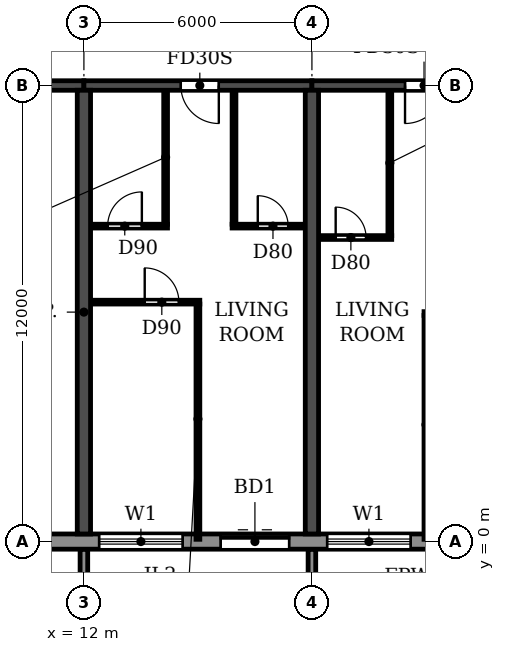
"""IFC4 building model, lengths in metres.
Left out: names, types, materials, properties, quantities, classifications, styles, units other than length and angle.
Written with IfcOpenShell. Run it as: python <this file> out.ifc"""

import sys

from ifc_helpers import new_model, si_unit, direction, frame, frame_2d, origin, place, context, subcontext, project, spatial, polyline, rectangle, outline, extrude, source, transform, mapped, element, fill, save


model = new_model("IFC4")
c1 = context("Model", 3, precision=1e-05, world=origin(), true_north=direction((0.0, 1.0)))
c2 = subcontext(c1, "Body", "Model", "MODEL_VIEW")
j1 = project(units=[si_unit("LENGTHUNIT", "METRE"), si_unit("PLANEANGLEUNIT", "RADIAN")], contexts=[c1])
p1 = place(None, origin())
s1 = spatial("IfcSite", under=j1, at=p1, CompositionType="ELEMENT")
p2 = place(p1, origin())
s2 = spatial("IfcBuilding", under=s1, at=p2, CompositionType="ELEMENT")
p3 = place(p2, frame((0.0, 0.0, 102.6)))
s3 = spatial("IfcBuildingStorey", under=s2, at=p3, CompositionType="ELEMENT", Elevation=102.6)
for number, where, z_axis, x_axis in (
    (1, (12.0, 0.2, 0.0), (0.0, 0.0, 1.0), (0.0, 1.0, 0.0)),
    (2, (18.0, 0.2, 0.0), (0.0, 0.0, 1.0), (0.0, 1.0, 0.0)),
):
    element("IfcWall", number, at=place(p3, frame(where, z_axis=z_axis, x_axis=x_axis)), inside=s3, PredefinedType="SHEAR", context=c2, shape_type="SweptSolid", body=[
        extrude(rectangle(XDim=11.675, YDim=0.35, at=frame_2d((5.837, 0.0))), origin(), (0.0, 0.0, 1.0), 3.0),
    ])
p4 = place(p3, frame((6.2, 12.0, 0.0), z_axis=(0.0, 0.0, 1.0), x_axis=(1.0, 0.0, 0.0)))
e3 = element("IfcWall", 3, at=p4, inside=s3, PredefinedType="SHEAR", context=c2, shape_type="SweptSolid", body=[
    extrude(rectangle(XDim=5.8, YDim=0.25, at=frame_2d((2.9, 0.0))), origin(), (0.0, 0.0, 1.0), 2.4),
])
p5 = place(p4, frame((2.3, 0.0, 0.0)))
e4 = element("IfcOpeningElement", 4, at=p5, cuts=e3, PredefinedType="OPENING", context=c2, shape_type="SweptSolid", body=[
    extrude(rectangle(XDim=1.0, YDim=2.1, at=frame_2d((0.5, 1.05))), frame((0.0, 0.135, 0.0), z_axis=(0.0, -1.0, 0.0), x_axis=(1.0, 0.0, 0.0)), (0.0, 0.0, 1.0), 0.27),
])
p6 = place(p3, frame((12.0, 12.0, 0.0), z_axis=(0.0, 0.0, 1.0), x_axis=(1.0, 0.0, 0.0)))
e5 = element("IfcWall", 5, at=p6, inside=s3, PredefinedType="SHEAR", context=c2, shape_type="SweptSolid", body=[
    extrude(rectangle(XDim=6.0, YDim=0.25, at=frame_2d((3.0, 0.0))), origin(), (0.0, 0.0, 1.0), 2.4),
])
p7 = place(p6, frame((2.55, 0.0, 0.0)))
e6 = element("IfcOpeningElement", 6, at=p7, cuts=e5, PredefinedType="OPENING", context=c2, shape_type="SweptSolid", body=[
    extrude(rectangle(XDim=1.0, YDim=2.1, at=frame_2d((0.5, 1.05))), frame((0.0, 0.135, 0.0), z_axis=(0.0, -1.0, 0.0), x_axis=(1.0, 0.0, 0.0)), (0.0, 0.0, 1.0), 0.27),
])
p8 = place(p3, frame((18.0, 12.0, 0.0), z_axis=(0.0, 0.0, 1.0), x_axis=(1.0, 0.0, 0.0)))
e7 = element("IfcWall", 7, at=p8, inside=s3, PredefinedType="SHEAR", context=c2, shape_type="SweptSolid", body=[
    extrude(rectangle(XDim=6.0, YDim=0.25, at=frame_2d((3.0, 0.0))), origin(), (0.0, 0.0, 1.0), 2.4),
])
p9 = place(p8, frame((2.45, 0.0, 0.0)))
e8 = element("IfcOpeningElement", 8, at=p9, cuts=e7, PredefinedType="OPENING", context=c2, shape_type="SweptSolid", body=[
    extrude(rectangle(XDim=1.0, YDim=2.1, at=frame_2d((0.5, 1.05))), frame((0.0, 0.135, 0.0), z_axis=(0.0, -1.0, 0.0), x_axis=(1.0, 0.0, 0.0)), (0.0, 0.0, 1.0), 0.27),
])
p10 = place(p3, frame((10.683, 0.0, 0.0), z_axis=(0.0, 0.0, 1.0), x_axis=(1.0, 0.0, 0.0)))
e9 = element("IfcWall", 9, at=p10, inside=s3, PredefinedType="STANDARD", context=c2, shape_type="SweptSolid", body=[
    extrude(rectangle(XDim=80.634, YDim=0.4, at=frame_2d((40.317, 0.0))), origin(), (0.0, 0.0, 1.0), 3.0),
])
p11 = place(p10, frame((1.717, 0.0, 0.9)))
e10 = element("IfcOpeningElement", 10, at=p11, cuts=e9, PredefinedType="OPENING", context=c2, shape_type="SweptSolid", body=[
    extrude(rectangle(XDim=2.2, YDim=1.5, at=frame_2d((1.1, 0.75))), frame((0.0, 0.21, 0.0), z_axis=(0.0, -1.0, 0.0), x_axis=(1.0, 0.0, 0.0)), (0.0, 0.0, 1.0), 0.42),
])
p12 = place(p10, frame((4.917, 0.0, 0.0)))
e11 = element("IfcOpeningElement", 11, at=p12, cuts=e9, PredefinedType="OPENING", context=c2, shape_type="SweptSolid", body=[
    extrude(rectangle(XDim=1.8, YDim=2.4, at=frame_2d((0.9, 1.2))), frame((0.0, 0.21, 0.0), z_axis=(0.0, -1.0, 0.0), x_axis=(1.0, 0.0, 0.0)), (0.0, 0.0, 1.0), 0.42),
])
p13 = place(p10, frame((7.717, 0.0, 0.9)))
e12 = element("IfcOpeningElement", 12, at=p13, cuts=e9, PredefinedType="OPENING", context=c2, shape_type="SweptSolid", body=[
    extrude(rectangle(XDim=2.2, YDim=1.5, at=frame_2d((1.1, 0.75))), frame((0.0, 0.21, 0.0), z_axis=(0.0, -1.0, 0.0), x_axis=(1.0, 0.0, 0.0)), (0.0, 0.0, 1.0), 0.42),
])
p14 = place(p10, frame((10.717, 0.0, 0.9)))
e13 = element("IfcOpeningElement", 13, at=p14, cuts=e9, PredefinedType="OPENING", context=c2, shape_type="SweptSolid", body=[
    extrude(rectangle(XDim=2.2, YDim=1.5, at=frame_2d((1.1, 0.75))), frame((0.0, 0.21, 0.0), z_axis=(0.0, -1.0, 0.0), x_axis=(1.0, 0.0, 0.0)), (0.0, 0.0, 1.0), 0.42),
])
p15 = place(p10, frame((13.717, 0.0, 0.9)))
e14 = element("IfcOpeningElement", 14, at=p15, cuts=e9, PredefinedType="OPENING", context=c2, shape_type="SweptSolid", body=[
    extrude(rectangle(XDim=2.2, YDim=1.5, at=frame_2d((1.1, 0.75))), frame((0.0, 0.21, 0.0), z_axis=(0.0, -1.0, 0.0), x_axis=(1.0, 0.0, 0.0)), (0.0, 0.0, 1.0), 0.42),
])
p16 = place(p10, frame((16.717, 0.0, 0.9)))
e15 = element("IfcOpeningElement", 15, at=p16, cuts=e9, PredefinedType="OPENING", context=c2, shape_type="SweptSolid", body=[
    extrude(rectangle(XDim=2.2, YDim=1.5, at=frame_2d((1.1, 0.75))), frame((0.0, 0.21, 0.0), z_axis=(0.0, -1.0, 0.0), x_axis=(1.0, 0.0, 0.0)), (0.0, 0.0, 1.0), 0.42),
])
p17 = place(p10, frame((19.717, 0.0, 0.9)))
e16 = element("IfcOpeningElement", 16, at=p17, cuts=e9, PredefinedType="OPENING", context=c2, shape_type="SweptSolid", body=[
    extrude(rectangle(XDim=2.2, YDim=1.5, at=frame_2d((1.1, 0.75))), frame((0.0, 0.21, 0.0), z_axis=(0.0, -1.0, 0.0), x_axis=(1.0, 0.0, 0.0)), (0.0, 0.0, 1.0), 0.42),
])
p18 = place(p10, frame((22.717, 0.0, 0.9)))
e17 = element("IfcOpeningElement", 17, at=p18, cuts=e9, PredefinedType="OPENING", context=c2, shape_type="SweptSolid", body=[
    extrude(rectangle(XDim=2.2, YDim=1.5, at=frame_2d((1.1, 0.75))), frame((0.0, 0.21, 0.0), z_axis=(0.0, -1.0, 0.0), x_axis=(1.0, 0.0, 0.0)), (0.0, 0.0, 1.0), 0.42),
])
p19 = place(p10, frame((25.717, 0.0, 0.9)))
e18 = element("IfcOpeningElement", 18, at=p19, cuts=e9, PredefinedType="OPENING", context=c2, shape_type="SweptSolid", body=[
    extrude(rectangle(XDim=2.2, YDim=1.5, at=frame_2d((1.1, 0.75))), frame((0.0, 0.21, 0.0), z_axis=(0.0, -1.0, 0.0), x_axis=(1.0, 0.0, 0.0)), (0.0, 0.0, 1.0), 0.42),
])
p20 = place(p10, frame((28.917, 0.0, 0.0)))
e19 = element("IfcOpeningElement", 19, at=p20, cuts=e9, PredefinedType="OPENING", context=c2, shape_type="SweptSolid", body=[
    extrude(rectangle(XDim=1.8, YDim=2.4, at=frame_2d((0.9, 1.2))), frame((0.0, 0.21, 0.0), z_axis=(0.0, -1.0, 0.0), x_axis=(1.0, 0.0, 0.0)), (0.0, 0.0, 1.0), 0.42),
])
p21 = place(p10, frame((31.717, 0.0, 0.9)))
e20 = element("IfcOpeningElement", 20, at=p21, cuts=e9, PredefinedType="OPENING", context=c2, shape_type="SweptSolid", body=[
    extrude(rectangle(XDim=2.2, YDim=1.5, at=frame_2d((1.1, 0.75))), frame((0.0, 0.21, 0.0), z_axis=(0.0, -1.0, 0.0), x_axis=(1.0, 0.0, 0.0)), (0.0, 0.0, 1.0), 0.42),
])
p22 = place(p10, frame((34.717, 0.0, 0.9)))
e21 = element("IfcOpeningElement", 21, at=p22, cuts=e9, PredefinedType="OPENING", context=c2, shape_type="SweptSolid", body=[
    extrude(rectangle(XDim=2.2, YDim=1.5, at=frame_2d((1.1, 0.75))), frame((0.0, 0.21, 0.0), z_axis=(0.0, -1.0, 0.0), x_axis=(1.0, 0.0, 0.0)), (0.0, 0.0, 1.0), 0.42),
])
p23 = place(p10, frame((37.717, 0.0, 0.9)))
e22 = element("IfcOpeningElement", 22, at=p23, cuts=e9, PredefinedType="OPENING", context=c2, shape_type="SweptSolid", body=[
    extrude(rectangle(XDim=2.2, YDim=1.5, at=frame_2d((1.1, 0.75))), frame((0.0, 0.21, 0.0), z_axis=(0.0, -1.0, 0.0), x_axis=(1.0, 0.0, 0.0)), (0.0, 0.0, 1.0), 0.42),
])
p24 = place(p10, frame((40.717, 0.0, 0.9)))
e23 = element("IfcOpeningElement", 23, at=p24, cuts=e9, PredefinedType="OPENING", context=c2, shape_type="SweptSolid", body=[
    extrude(rectangle(XDim=2.2, YDim=1.5, at=frame_2d((1.1, 0.75))), frame((0.0, 0.21, 0.0), z_axis=(0.0, -1.0, 0.0), x_axis=(1.0, 0.0, 0.0)), (0.0, 0.0, 1.0), 0.42),
])
p25 = place(p10, frame((43.717, 0.0, 0.9)))
e24 = element("IfcOpeningElement", 24, at=p25, cuts=e9, PredefinedType="OPENING", context=c2, shape_type="SweptSolid", body=[
    extrude(rectangle(XDim=2.2, YDim=1.5, at=frame_2d((1.1, 0.75))), frame((0.0, 0.21, 0.0), z_axis=(0.0, -1.0, 0.0), x_axis=(1.0, 0.0, 0.0)), (0.0, 0.0, 1.0), 0.42),
])
p26 = place(p10, frame((46.717, 0.0, 0.9)))
e25 = element("IfcOpeningElement", 25, at=p26, cuts=e9, PredefinedType="OPENING", context=c2, shape_type="SweptSolid", body=[
    extrude(rectangle(XDim=2.2, YDim=1.5, at=frame_2d((1.1, 0.75))), frame((0.0, 0.21, 0.0), z_axis=(0.0, -1.0, 0.0), x_axis=(1.0, 0.0, 0.0)), (0.0, 0.0, 1.0), 0.42),
])
p27 = place(p10, frame((49.917, 0.0, 0.0)))
e26 = element("IfcOpeningElement", 26, at=p27, cuts=e9, PredefinedType="OPENING", context=c2, shape_type="SweptSolid", body=[
    extrude(rectangle(XDim=1.8, YDim=2.4, at=frame_2d((0.9, 1.2))), frame((0.0, 0.21, 0.0), z_axis=(0.0, -1.0, 0.0), x_axis=(1.0, 0.0, 0.0)), (0.0, 0.0, 1.0), 0.42),
])
p28 = place(p10, frame((52.717, 0.0, 0.9)))
e27 = element("IfcOpeningElement", 27, at=p28, cuts=e9, PredefinedType="OPENING", context=c2, shape_type="SweptSolid", body=[
    extrude(rectangle(XDim=2.2, YDim=1.5, at=frame_2d((1.1, 0.75))), frame((0.0, 0.21, 0.0), z_axis=(0.0, -1.0, 0.0), x_axis=(1.0, 0.0, 0.0)), (0.0, 0.0, 1.0), 0.42),
])
p29 = place(p10, frame((55.717, 0.0, 0.9)))
e28 = element("IfcOpeningElement", 28, at=p29, cuts=e9, PredefinedType="OPENING", context=c2, shape_type="SweptSolid", body=[
    extrude(rectangle(XDim=2.2, YDim=1.5, at=frame_2d((1.1, 0.75))), frame((0.0, 0.21, 0.0), z_axis=(0.0, -1.0, 0.0), x_axis=(1.0, 0.0, 0.0)), (0.0, 0.0, 1.0), 0.42),
])
p30 = place(p10, frame((58.717, 0.0, 0.9)))
e29 = element("IfcOpeningElement", 29, at=p30, cuts=e9, PredefinedType="OPENING", context=c2, shape_type="SweptSolid", body=[
    extrude(rectangle(XDim=2.2, YDim=1.5, at=frame_2d((1.1, 0.75))), frame((0.0, 0.21, 0.0), z_axis=(0.0, -1.0, 0.0), x_axis=(1.0, 0.0, 0.0)), (0.0, 0.0, 1.0), 0.42),
])
p31 = place(p10, frame((61.717, 0.0, 0.9)))
e30 = element("IfcOpeningElement", 30, at=p31, cuts=e9, PredefinedType="OPENING", context=c2, shape_type="SweptSolid", body=[
    extrude(rectangle(XDim=2.2, YDim=1.5, at=frame_2d((1.1, 0.75))), frame((0.0, 0.21, 0.0), z_axis=(0.0, -1.0, 0.0), x_axis=(1.0, 0.0, 0.0)), (0.0, 0.0, 1.0), 0.42),
])
p32 = place(p10, frame((64.717, 0.0, 0.9)))
e31 = element("IfcOpeningElement", 31, at=p32, cuts=e9, PredefinedType="OPENING", context=c2, shape_type="SweptSolid", body=[
    extrude(rectangle(XDim=2.2, YDim=1.5, at=frame_2d((1.1, 0.75))), frame((0.0, 0.21, 0.0), z_axis=(0.0, -1.0, 0.0), x_axis=(1.0, 0.0, 0.0)), (0.0, 0.0, 1.0), 0.42),
])
p33 = place(p10, frame((67.717, 0.0, 0.9)))
e32 = element("IfcOpeningElement", 32, at=p33, cuts=e9, PredefinedType="OPENING", context=c2, shape_type="SweptSolid", body=[
    extrude(rectangle(XDim=2.2, YDim=1.5, at=frame_2d((1.1, 0.75))), frame((0.0, 0.21, 0.0), z_axis=(0.0, -1.0, 0.0), x_axis=(1.0, 0.0, 0.0)), (0.0, 0.0, 1.0), 0.42),
])
p34 = place(p10, frame((70.717, 0.0, 0.9)))
e33 = element("IfcOpeningElement", 33, at=p34, cuts=e9, PredefinedType="OPENING", context=c2, shape_type="SweptSolid", body=[
    extrude(rectangle(XDim=2.2, YDim=1.5, at=frame_2d((1.1, 0.75))), frame((0.0, 0.21, 0.0), z_axis=(0.0, -1.0, 0.0), x_axis=(1.0, 0.0, 0.0)), (0.0, 0.0, 1.0), 0.42),
])
p35 = place(p10, frame((73.717, 0.0, 0.9)))
e34 = element("IfcOpeningElement", 34, at=p35, cuts=e9, PredefinedType="OPENING", context=c2, shape_type="SweptSolid", body=[
    extrude(rectangle(XDim=2.2, YDim=1.5, at=frame_2d((1.1, 0.75))), frame((0.0, 0.21, 0.0), z_axis=(0.0, -1.0, 0.0), x_axis=(1.0, 0.0, 0.0)), (0.0, 0.0, 1.0), 0.42),
])
p36 = place(p10, frame((76.917, 0.0, 0.0)))
e35 = element("IfcOpeningElement", 35, at=p36, cuts=e9, PredefinedType="OPENING", context=c2, shape_type="SweptSolid", body=[
    extrude(rectangle(XDim=1.8, YDim=2.4, at=frame_2d((0.9, 1.2))), frame((0.0, 0.21, 0.0), z_axis=(0.0, -1.0, 0.0), x_axis=(1.0, 0.0, 0.0)), (0.0, 0.0, 1.0), 0.42),
])
m1 = source(origin(), c2, "Body", "SweptSolid", [
    extrude(outline(polyline([(0.0, 0.0), (0.2, 0.0), (0.2, 1.65), (0.0, 1.65), (0.0, 0.0)])), origin(), (0.0, 0.0, 1.0), 3.1),
])
for number, where in (
    (36, (11.9, -1.85, 0.0)),
    (37, (17.9, -1.85, 0.0)),
):
    element("IfcWall", number, at=place(p3, frame(where)), inside=s3, PredefinedType="STANDARD", context=c2, shape_type="MappedRepresentation", body=[
        mapped(m1, transform((0.0, 0.0, 0.0))),
    ])
p37 = place(p3, frame((20.95, 6.0, 0.0), z_axis=(0.0, 0.0, 1.0), x_axis=(1.0, 0.0, 0.0)))
e38 = element("IfcWall", 38, at=p37, inside=s3, PredefinedType="PARTITIONING", context=c2, shape_type="SweptSolid", body=[
    extrude(rectangle(XDim=2.865, YDim=0.1, at=frame_2d((1.433, 0.0))), origin(), (0.0, 0.0, 1.0), 3.0),
])
p38 = place(p37, frame((1.65, 0.0, 0.0)))
e39 = element("IfcOpeningElement", 39, at=p38, cuts=e38, PredefinedType="OPENING", context=c2, shape_type="SweptSolid", body=[
    extrude(rectangle(XDim=0.9, YDim=2.1, at=frame_2d((0.45, 1.05))), frame((0.0, 0.06, 0.0), z_axis=(0.0, -1.0, 0.0), x_axis=(1.0, 0.0, 0.0)), (0.0, 0.0, 1.0), 0.12),
])
p39 = place(p3, frame((12.185, 6.3, 0.0), z_axis=(0.0, 0.0, 1.0), x_axis=(1.0, 0.0, 0.0)))
e40 = element("IfcWall", 40, at=p39, inside=s3, PredefinedType="PARTITIONING", context=c2, shape_type="SweptSolid", body=[
    extrude(rectangle(XDim=2.865, YDim=0.1, at=frame_2d((1.433, 0.0))), origin(), (0.0, 0.0, 1.0), 3.0),
])
p40 = place(p39, frame((1.415, 0.0, 0.0)))
e41 = element("IfcOpeningElement", 41, at=p40, cuts=e40, PredefinedType="OPENING", context=c2, shape_type="SweptSolid", body=[
    extrude(rectangle(XDim=0.9, YDim=2.1, at=frame_2d((0.45, 1.05))), frame((0.0, 0.06, 0.0), z_axis=(0.0, -1.0, 0.0), x_axis=(1.0, 0.0, 0.0)), (0.0, 0.0, 1.0), 0.12),
])
p41 = place(p3, frame((18.185, 8.0, 0.0), z_axis=(0.0, 0.0, 1.0), x_axis=(1.0, 0.0, 0.0)))
e42 = element("IfcWall", 42, at=p41, inside=s3, PredefinedType="PARTITIONING", context=c2, shape_type="SweptSolid", body=[
    extrude(rectangle(XDim=1.915, YDim=0.1, at=frame_2d((0.958, 0.0))), origin(), (0.0, 0.0, 1.0), 3.0),
])
p42 = place(p41, frame((0.44, 0.0, 0.0)))
e43 = element("IfcOpeningElement", 43, at=p42, cuts=e42, PredefinedType="OPENING", context=c2, shape_type="SweptSolid", body=[
    extrude(rectangle(XDim=0.8, YDim=2.1, at=frame_2d((0.4, 1.05))), frame((0.0, 0.06, 0.0), z_axis=(0.0, -1.0, 0.0), x_axis=(1.0, 0.0, 0.0)), (0.0, 0.0, 1.0), 0.12),
])
p43 = place(p3, frame((12.185, 8.3, 0.0), z_axis=(0.0, 0.0, 1.0), x_axis=(1.0, 0.0, 0.0)))
e44 = element("IfcWall", 44, at=p43, inside=s3, PredefinedType="PARTITIONING", context=c2, shape_type="SweptSolid", body=[
    extrude(rectangle(XDim=2.015, YDim=0.1, at=frame_2d((1.007, 0.0))), origin(), (0.0, 0.0, 1.0), 3.0),
])
p44 = place(p43, frame((0.44, 0.0, 0.0)))
e45 = element("IfcOpeningElement", 45, at=p44, cuts=e44, PredefinedType="OPENING", context=c2, shape_type="SweptSolid", body=[
    extrude(rectangle(XDim=0.9, YDim=2.1, at=frame_2d((0.45, 1.05))), frame((0.0, 0.06, 0.0), z_axis=(0.0, -1.0, 0.0), x_axis=(1.0, 0.0, 0.0)), (0.0, 0.0, 1.0), 0.12),
])
p45 = place(p3, frame((15.9, 8.3, 0.0), z_axis=(0.0, 0.0, 1.0), x_axis=(1.0, 0.0, 0.0)))
e46 = element("IfcWall", 46, at=p45, inside=s3, PredefinedType="PARTITIONING", context=c2, shape_type="SweptSolid", body=[
    extrude(rectangle(XDim=1.915, YDim=0.1, at=frame_2d((0.958, 0.0))), origin(), (0.0, 0.0, 1.0), 3.0),
])
p46 = place(p45, frame((0.675, 0.0, 0.0)))
e47 = element("IfcOpeningElement", 47, at=p46, cuts=e46, PredefinedType="OPENING", context=c2, shape_type="SweptSolid", body=[
    extrude(rectangle(XDim=0.8, YDim=2.1, at=frame_2d((0.4, 1.05))), frame((0.0, 0.06, 0.0), z_axis=(0.0, -1.0, 0.0), x_axis=(1.0, 0.0, 0.0)), (0.0, 0.0, 1.0), 0.12),
])
p47 = place(p3, frame((14.15, 8.35, 0.0), z_axis=(0.0, 0.0, 1.0), x_axis=(0.0, 1.0, 0.0)))
e48 = element("IfcWall", 48, at=p47, inside=s3, PredefinedType="PARTITIONING", context=c2, shape_type="SweptSolid", body=[
    extrude(rectangle(XDim=3.515, YDim=0.1, at=frame_2d((1.757, 0.0))), origin(), (0.0, 0.0, 1.0), 3.0),
])
p48 = place(p3, frame((15.0, 0.06, 0.0), z_axis=(0.0, 0.0, 1.0), x_axis=(0.0, 1.0, 0.0)))
e49 = element("IfcWall", 49, at=p48, inside=s3, PredefinedType="PARTITIONING", context=c2, shape_type="SweptSolid", body=[
    extrude(rectangle(XDim=6.19, YDim=0.1, at=frame_2d((3.095, 0.0))), origin(), (0.0, 0.0, 1.0), 3.0),
])
p49 = place(p3, frame((15.95, 8.35, 0.0), z_axis=(0.0, 0.0, 1.0), x_axis=(0.0, 1.0, 0.0)))
e50 = element("IfcWall", 50, at=p49, inside=s3, PredefinedType="PARTITIONING", context=c2, shape_type="SweptSolid", body=[
    extrude(rectangle(XDim=3.515, YDim=0.1, at=frame_2d((1.757, 0.0))), origin(), (0.0, 0.0, 1.0), 3.0),
])
p50 = place(p3, frame((20.05, 8.05, 0.0), z_axis=(0.0, 0.0, 1.0), x_axis=(0.0, 1.0, 0.0)))
e51 = element("IfcWall", 51, at=p50, inside=s3, PredefinedType="PARTITIONING", context=c2, shape_type="SweptSolid", body=[
    extrude(rectangle(XDim=3.815, YDim=0.1, at=frame_2d((1.907, 0.0))), origin(), (0.0, 0.0, 1.0), 3.0),
])
p51 = place(p3, frame((21.0, 0.06, 0.0), z_axis=(0.0, 0.0, 1.0), x_axis=(0.0, 1.0, 0.0)))
e52 = element("IfcWall", 52, at=p51, inside=s3, PredefinedType="PARTITIONING", context=c2, shape_type="SweptSolid", body=[
    extrude(rectangle(XDim=5.89, YDim=0.1, at=frame_2d((2.945, 0.0))), origin(), (0.0, 0.0, 1.0), 3.0),
])
p52 = place(p11, origin())
e53 = element("IfcWindow", 53, at=p52, inside=s3, PartitioningType="DOUBLE_PANEL_HORIZONTAL", PredefinedType="WINDOW", context=c2, shape_type="SweptSolid", body=[
    extrude(rectangle(XDim=2.2, YDim=1.5, at=frame_2d((1.1, 0.75))), frame((0.0, 0.03, 0.0), z_axis=(0.0, -1.0, 0.0), x_axis=(1.0, 0.0, 0.0)), (0.0, 0.0, 1.0), 0.06),
])
fill(e10, e53)
p53 = place(p12, origin())
e54 = element("IfcDoor", 54, at=p53, inside=s3, OperationType="DOUBLE_DOOR_SLIDING", PredefinedType="DOOR", context=c2, shape_type="SweptSolid", body=[
    extrude(rectangle(XDim=1.8, YDim=2.4, at=frame_2d((0.9, 1.2))), frame((0.0, 0.025, 0.0), z_axis=(0.0, -1.0, 0.0), x_axis=(1.0, 0.0, 0.0)), (0.0, 0.0, 1.0), 0.05),
])
fill(e11, e54)
p54 = place(p13, origin())
e55 = element("IfcWindow", 55, at=p54, inside=s3, PartitioningType="DOUBLE_PANEL_HORIZONTAL", PredefinedType="WINDOW", context=c2, shape_type="SweptSolid", body=[
    extrude(rectangle(XDim=2.2, YDim=1.5, at=frame_2d((1.1, 0.75))), frame((0.0, 0.03, 0.0), z_axis=(0.0, -1.0, 0.0), x_axis=(1.0, 0.0, 0.0)), (0.0, 0.0, 1.0), 0.06),
])
fill(e12, e55)
p55 = place(p44, origin())
e56 = element("IfcDoor", 56, at=p55, inside=s3, OperationType="SINGLE_SWING_RIGHT", PredefinedType="DOOR", context=c2, shape_type="SweptSolid", body=[
    extrude(rectangle(XDim=0.9, YDim=2.1, at=frame_2d((0.45, 1.05))), frame((0.0, 0.025, 0.0), z_axis=(0.0, -1.0, 0.0), x_axis=(1.0, 0.0, 0.0)), (0.0, 0.0, 1.0), 0.05),
])
fill(e45, e56)
p56 = place(p40, origin())
e57 = element("IfcDoor", 57, at=p56, inside=s3, OperationType="SINGLE_SWING_LEFT", PredefinedType="DOOR", context=c2, shape_type="SweptSolid", body=[
    extrude(rectangle(XDim=0.9, YDim=2.1, at=frame_2d((0.45, 1.05))), frame((0.0, 0.025, 0.0), z_axis=(0.0, -1.0, 0.0), x_axis=(1.0, 0.0, 0.0)), (0.0, 0.0, 1.0), 0.05),
])
fill(e41, e57)
p57 = place(p7, frame((1.0, 0.0, 0.0), z_axis=(0.0, 0.0, 1.0), x_axis=(-1.0, 0.0, 0.0)))
e58 = element("IfcDoor", 58, at=p57, inside=s3, OperationType="SINGLE_SWING_LEFT", PredefinedType="DOOR", context=c2, shape_type="SweptSolid", body=[
    extrude(rectangle(XDim=1.0, YDim=2.1, at=frame_2d((0.5, 1.05))), frame((0.0, 0.025, 0.0), z_axis=(0.0, -1.0, 0.0), x_axis=(1.0, 0.0, 0.0)), (0.0, 0.0, 1.0), 0.05),
])
fill(e6, e58)
p58 = place(p46, origin())
e59 = element("IfcDoor", 59, at=p58, inside=s3, OperationType="SINGLE_SWING_LEFT", PredefinedType="DOOR", context=c2, shape_type="SweptSolid", body=[
    extrude(rectangle(XDim=0.8, YDim=2.1, at=frame_2d((0.4, 1.05))), frame((0.0, 0.025, 0.0), z_axis=(0.0, -1.0, 0.0), x_axis=(1.0, 0.0, 0.0)), (0.0, 0.0, 1.0), 0.05),
])
fill(e47, e59)
p59 = place(p42, origin())
e60 = element("IfcDoor", 60, at=p59, inside=s3, OperationType="SINGLE_SWING_LEFT", PredefinedType="DOOR", context=c2, shape_type="SweptSolid", body=[
    extrude(rectangle(XDim=0.8, YDim=2.1, at=frame_2d((0.4, 1.05))), frame((0.0, 0.025, 0.0), z_axis=(0.0, -1.0, 0.0), x_axis=(1.0, 0.0, 0.0)), (0.0, 0.0, 1.0), 0.05),
])
fill(e43, e60)
p60 = place(p9, frame((1.0, 0.0, 0.0), z_axis=(0.0, 0.0, 1.0), x_axis=(-1.0, 0.0, 0.0)))
e61 = element("IfcDoor", 61, at=p60, inside=s3, OperationType="SINGLE_SWING_RIGHT", PredefinedType="DOOR", context=c2, shape_type="SweptSolid", body=[
    extrude(rectangle(XDim=1.0, YDim=2.1, at=frame_2d((0.5, 1.05))), frame((0.0, 0.025, 0.0), z_axis=(0.0, -1.0, 0.0), x_axis=(1.0, 0.0, 0.0)), (0.0, 0.0, 1.0), 0.05),
])
fill(e8, e61)
save(model, sys.argv[1])
